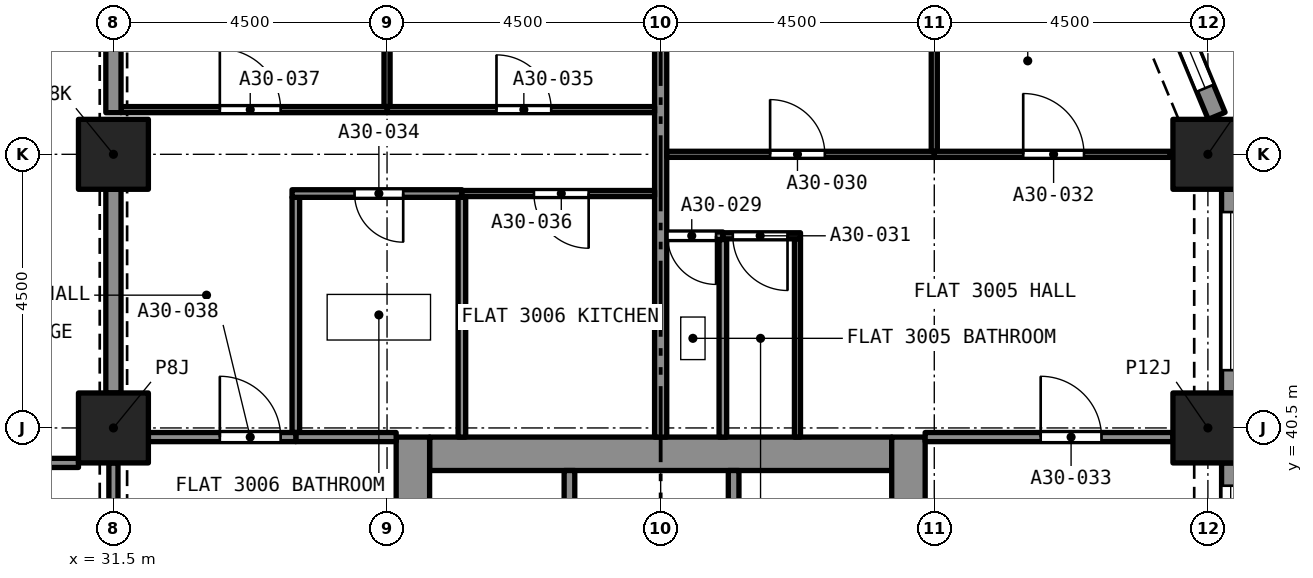
"""IFC4 building model, lengths in metres.
Left out: names, types, materials, properties, quantities, classifications, styles, units other than length and angle.
Written with IfcOpenShell. Run it as: python <this file> out.ifc"""

import sys

from ifc_helpers import new_model, si_unit, direction, frame, frame_2d, origin, origin_2d, place, context, subcontext, project, spatial, rectangle, extrude, element, fill, save


model = new_model("IFC4")
c1 = context("Model", 3, precision=1e-05, world=origin(), true_north=direction((0.0, 1.0)))
c2 = subcontext(c1, "Body", "Model", "MODEL_VIEW")
j1 = project(units=[si_unit("LENGTHUNIT", "METRE"), si_unit("PLANEANGLEUNIT", "RADIAN")], contexts=[c1])
p1 = place(None, origin())
s1 = spatial("IfcSite", under=j1, at=p1, CompositionType="ELEMENT")
p2 = place(p1, origin())
s2 = spatial("IfcBuilding", under=s1, at=p2, CompositionType="ELEMENT")
p3 = place(p2, frame((0.0, 0.0, 108.8)))
s3 = spatial("IfcBuildingStorey", under=s2, at=p3, CompositionType="ELEMENT", Elevation=108.8)
for number, where, z_axis, x_axis in (
    (1, (31.5, 40.5, 0.0), (0.0, 0.0, 1.0), (1.0, 0.0, 0.0)),
    (2, (49.5, 40.5, 0.0), (0.0, 0.0, 1.0), (1.0, 0.0, 0.0)),
    (3, (31.5, 45.0, 0.0), (0.0, 0.0, 1.0), (1.0, 0.0, 0.0)),
    (4, (49.5, 45.0, 0.0), (0.0, 0.0, 1.0), (1.0, 0.0, 0.0)),
):
    element("IfcColumn", number, at=place(p3, frame(where, z_axis=z_axis, x_axis=x_axis)), inside=s3, PredefinedType="COLUMN", context=c2, shape_type="SweptSolid", body=[
        extrude(rectangle(XDim=1.15, YDim=1.15, at=origin_2d()), origin(), (0.0, 0.0, 1.0), 3.2),
    ])
p4 = place(p3, frame((36.7, 40.075, 0.0), z_axis=(0.0, 0.0, 1.0), x_axis=(1.0, 0.0, 0.0)))
e5 = element("IfcWall", 5, at=p4, inside=s3, PredefinedType="SOLIDWALL", context=c2, shape_type="SweptSolid", body=[
    extrude(rectangle(XDim=7.6, YDim=0.55, at=frame_2d((3.8, 0.0))), origin(), (0.0, 0.0, 1.0), 3.2),
])
p5 = place(p3, frame((36.425, 27.15, 0.0), z_axis=(0.0, 0.0, 1.0), x_axis=(0.0, 1.0, 0.0)))
e6 = element("IfcWall", 6, at=p5, inside=s3, PredefinedType="SOLIDWALL", context=c2, shape_type="SweptSolid", body=[
    extrude(rectangle(XDim=13.2, YDim=0.55, at=frame_2d((6.6, 0.0))), origin(), (0.0, 0.0, 1.0), 3.2),
])
p6 = place(p5, frame((8.8, 0.0, 0.0)))
e7 = element("IfcOpeningElement", 7, at=p6, cuts=e6, PredefinedType="OPENING", context=c2, shape_type="SweptSolid", body=[
    extrude(rectangle(XDim=1.2, YDim=2.1, at=frame_2d((0.6, 1.05))), frame((0.0, 0.285, 0.0), z_axis=(0.0, -1.0, 0.0), x_axis=(1.0, 0.0, 0.0)), (0.0, 0.0, 1.0), 0.57),
])
p7 = place(p3, frame((44.575, 27.15, 0.0), z_axis=(0.0, 0.0, 1.0), x_axis=(0.0, 1.0, 0.0)))
e8 = element("IfcWall", 8, at=p7, inside=s3, PredefinedType="SOLIDWALL", context=c2, shape_type="SweptSolid", body=[
    extrude(rectangle(XDim=13.2, YDim=0.55, at=frame_2d((6.6, 0.0))), origin(), (0.0, 0.0, 1.0), 3.2),
])
p8 = place(p7, frame((8.8, 0.0, 0.0)))
e9 = element("IfcOpeningElement", 9, at=p8, cuts=e8, PredefinedType="OPENING", context=c2, shape_type="SweptSolid", body=[
    extrude(rectangle(XDim=1.2, YDim=2.1, at=frame_2d((0.6, 1.05))), frame((0.0, 0.285, 0.0), z_axis=(0.0, -1.0, 0.0), x_axis=(1.0, 0.0, 0.0)), (0.0, 0.0, 1.0), 0.57),
])
p9 = place(p3, frame((49.875, 39.925, 0.0), z_axis=(0.0, 0.0, 1.0), x_axis=(0.0, -1.0, 0.0)))
e10 = element("IfcWall", 10, at=p9, inside=s3, PredefinedType="SOLIDWALL", context=c2, shape_type="SweptSolid", body=[
    extrude(rectangle(XDim=3.35, YDim=0.3, at=frame_2d((1.675, 0.0))), origin(), (0.0, 0.0, 1.0), 3.2),
])
p10 = place(p9, frame((0.375, 0.0, 0.45)))
e11 = element("IfcOpeningElement", 11, at=p10, cuts=e10, PredefinedType="OPENING", context=c2, shape_type="SweptSolid", body=[
    extrude(rectangle(XDim=2.6, YDim=1.95, at=frame_2d((1.3, 0.975))), frame((0.0, 0.16, 0.0), z_axis=(0.0, -1.0, 0.0), x_axis=(1.0, 0.0, 0.0)), (0.0, 0.0, 1.0), 0.32),
])
p11 = place(p3, frame((49.875, 44.425, 0.0), z_axis=(0.0, 0.0, 1.0), x_axis=(0.0, -1.0, 0.0)))
e12 = element("IfcWall", 12, at=p11, inside=s3, PredefinedType="SOLIDWALL", context=c2, shape_type="SweptSolid", body=[
    extrude(rectangle(XDim=3.35, YDim=0.3, at=frame_2d((1.675, 0.0))), origin(), (0.0, 0.0, 1.0), 3.2),
])
p12 = place(p11, frame((0.375, 0.0, 0.45)))
e13 = element("IfcOpeningElement", 13, at=p12, cuts=e12, PredefinedType="OPENING", context=c2, shape_type="SweptSolid", body=[
    extrude(rectangle(XDim=2.6, YDim=1.95, at=frame_2d((1.3, 0.975))), frame((0.0, 0.16, 0.0), z_axis=(0.0, -1.0, 0.0), x_axis=(1.0, 0.0, 0.0)), (0.0, 0.0, 1.0), 0.32),
])
p13 = place(p3, frame((48.816, 47.631, 0.0), z_axis=(0.0, 0.0, 1.0), x_axis=(0.382723818695, -0.923862802911, 0.0)))
e14 = element("IfcWall", 14, at=p13, inside=s3, PredefinedType="SOLIDWALL", context=c2, shape_type="SweptSolid", body=[
    extrude(rectangle(XDim=2.164, YDim=0.3, at=frame_2d((1.082, 0.0))), origin(), (0.0, 0.0, 1.0), 3.2),
])
p14 = place(p13, frame((0.271, 0.0, 0.45)))
e15 = element("IfcOpeningElement", 15, at=p14, cuts=e14, PredefinedType="OPENING", context=c2, shape_type="SweptSolid", body=[
    extrude(rectangle(XDim=1.4, YDim=1.95, at=frame_2d((0.7, 0.975))), frame((0.0, 0.16, 0.0), z_axis=(0.0, -1.0, 0.0), x_axis=(1.0, 0.0, 0.0)), (0.0, 0.0, 1.0), 0.32),
])
p15 = place(p3, frame((41.523, 43.66, 0.0), z_axis=(0.0, 0.0, 1.0), x_axis=(-1.0, 0.0, 0.0)))
e16 = element("IfcWall", 16, at=p15, inside=s3, PredefinedType="PARTITIONING", context=c2, shape_type="SweptSolid", body=[
    extrude(rectangle(XDim=0.923, YDim=0.125, at=frame_2d((0.461, 0.0))), origin(), (0.0, 0.0, 1.0), 2.9),
])
p16 = place(p15, frame((0.111, 0.0, 0.0)))
e17 = element("IfcOpeningElement", 17, at=p16, cuts=e16, PredefinedType="OPENING", context=c2, shape_type="SweptSolid", body=[
    extrude(rectangle(XDim=0.8, YDim=2.1, at=frame_2d((0.4, 1.05))), frame((0.0, 0.073, 0.0), z_axis=(0.0, -1.0, 0.0), x_axis=(1.0, 0.0, 0.0)), (0.0, 0.0, 1.0), 0.145),
])
p17 = place(p3, frame((41.523, 40.35, 0.0), z_axis=(0.0, 0.0, 1.0), x_axis=(0.0, 1.0, 0.0)))
e18 = element("IfcWall", 18, at=p17, inside=s3, PredefinedType="PARTITIONING", context=c2, shape_type="SweptSolid", body=[
    extrude(rectangle(XDim=3.247, YDim=0.125, at=frame_2d((1.624, 0.0))), origin(), (0.0, 0.0, 1.0), 2.9),
])
p18 = place(p3, frame((40.5, 40.35, 0.0), z_axis=(0.0, 0.0, 1.0), x_axis=(0.0, 1.0, 0.0)))
e19 = element("IfcWall", 19, at=p18, inside=s3, PredefinedType="PARTITIONING", context=c2, shape_type="SweptSolid", body=[
    extrude(rectangle(XDim=8.575, YDim=0.2, at=frame_2d((4.288, 0.0))), origin(), (0.0, 0.0, 1.0), 2.9),
])
p19 = place(p3, frame((40.6, 45.0, 0.0), z_axis=(0.0, 0.0, 1.0), x_axis=(1.0, 0.0, 0.0)))
e20 = element("IfcWall", 20, at=p19, inside=s3, PredefinedType="PARTITIONING", context=c2, shape_type="SweptSolid", body=[
    extrude(rectangle(XDim=4.4, YDim=0.1, at=frame_2d((2.2, 0.0))), origin(), (0.0, 0.0, 1.0), 2.9),
])
p20 = place(p19, frame((1.7, 0.0, 0.0)))
e21 = element("IfcOpeningElement", 21, at=p20, cuts=e20, PredefinedType="OPENING", context=c2, shape_type="SweptSolid", body=[
    extrude(rectangle(XDim=0.9, YDim=2.1, at=frame_2d((0.45, 1.05))), frame((0.0, 0.06, 0.0), z_axis=(0.0, -1.0, 0.0), x_axis=(1.0, 0.0, 0.0)), (0.0, 0.0, 1.0), 0.12),
])
p21 = place(p3, frame((45.0, 45.05, 0.0), z_axis=(0.0, 0.0, 1.0), x_axis=(0.0, 1.0, 0.0)))
e22 = element("IfcWall", 22, at=p21, inside=s3, PredefinedType="PARTITIONING", context=c2, shape_type="SweptSolid", body=[
    extrude(rectangle(XDim=3.828, YDim=0.1, at=frame_2d((1.914, 0.0))), origin(), (0.0, 0.0, 1.0), 2.9),
])
p22 = place(p3, frame((42.75, 40.35, 0.0), z_axis=(0.0, 0.0, 1.0), x_axis=(0.0, 1.0, 0.0)))
e23 = element("IfcWall", 23, at=p22, inside=s3, PredefinedType="PARTITIONING", context=c2, shape_type="SweptSolid", body=[
    extrude(rectangle(XDim=3.26, YDim=0.1, at=frame_2d((1.63, 0.0))), origin(), (0.0, 0.0, 1.0), 2.9),
])
p23 = place(p3, frame((42.8, 43.66, 0.0), z_axis=(0.0, 0.0, 1.0), x_axis=(-1.0, 0.0, 0.0)))
e24 = element("IfcWall", 24, at=p23, inside=s3, PredefinedType="PARTITIONING", context=c2, shape_type="SweptSolid", body=[
    extrude(rectangle(XDim=1.277, YDim=0.1, at=frame_2d((0.639, 0.0))), origin(), (0.0, 0.0, 1.0), 2.9),
])
p24 = place(p23, frame((0.214, 0.0, 0.0)))
e25 = element("IfcOpeningElement", 25, at=p24, cuts=e24, PredefinedType="OPENING", context=c2, shape_type="SweptSolid", body=[
    extrude(rectangle(XDim=0.9, YDim=2.1, at=frame_2d((0.45, 1.05))), frame((0.0, 0.06, 0.0), z_axis=(0.0, -1.0, 0.0), x_axis=(1.0, 0.0, 0.0)), (0.0, 0.0, 1.0), 0.12),
])
p25 = place(p3, frame((45.0, 45.0, 0.0), z_axis=(0.0, 0.0, 1.0), x_axis=(1.0, 0.0, 0.0)))
e26 = element("IfcWall", 26, at=p25, inside=s3, PredefinedType="PARTITIONING", context=c2, shape_type="SweptSolid", body=[
    extrude(rectangle(XDim=3.878, YDim=0.1, at=frame_2d((1.939, 0.0))), origin(), (0.0, 0.0, 1.0), 2.9),
])
p26 = place(p25, frame((1.462, 0.0, 0.0)))
e27 = element("IfcOpeningElement", 27, at=p26, cuts=e26, PredefinedType="OPENING", context=c2, shape_type="SweptSolid", body=[
    extrude(rectangle(XDim=1.0, YDim=2.1, at=frame_2d((0.5, 1.05))), frame((0.0, 0.06, 0.0), z_axis=(0.0, -1.0, 0.0), x_axis=(1.0, 0.0, 0.0)), (0.0, 0.0, 1.0), 0.12),
])
p27 = place(p3, frame((44.85, 40.35, 0.0), z_axis=(0.0, 0.0, 1.0), x_axis=(1.0, 0.0, 0.0)))
e28 = element("IfcWall", 28, at=p27, inside=s3, PredefinedType="PARTITIONING", context=c2, shape_type="SweptSolid", body=[
    extrude(rectangle(XDim=4.075, YDim=0.15, at=frame_2d((2.038, 0.0))), origin(), (0.0, 0.0, 1.0), 2.9),
])
p28 = place(p27, frame((1.9, 0.0, 0.0)))
e29 = element("IfcOpeningElement", 29, at=p28, cuts=e28, PredefinedType="OPENING", context=c2, shape_type="SweptSolid", body=[
    extrude(rectangle(XDim=1.0, YDim=2.1, at=frame_2d((0.5, 1.05))), frame((0.0, 0.085, 0.0), z_axis=(0.0, -1.0, 0.0), x_axis=(1.0, 0.0, 0.0)), (0.0, 0.0, 1.0), 0.17),
])
p29 = place(p3, frame((34.5, 40.425, 0.0), z_axis=(0.0, 0.0, 1.0), x_axis=(0.0, 1.0, 0.0)))
e30 = element("IfcWall", 30, at=p29, inside=s3, PredefinedType="PARTITIONING", context=c2, shape_type="SweptSolid", body=[
    extrude(rectangle(XDim=3.867, YDim=0.125, at=frame_2d((1.934, 0.0))), origin(), (0.0, 0.0, 1.0), 2.9),
])
p30 = place(p3, frame((37.231, 44.355, 0.0), z_axis=(0.0, 0.0, 1.0), x_axis=(-1.0, 0.0, 0.0)))
e31 = element("IfcWall", 31, at=p30, inside=s3, PredefinedType="PARTITIONING", context=c2, shape_type="SweptSolid", body=[
    extrude(rectangle(XDim=2.794, YDim=0.125, at=frame_2d((1.397, 0.0))), origin(), (0.0, 0.0, 1.0), 2.9),
])
p31 = place(p30, frame((0.966, 0.0, 0.0)))
e32 = element("IfcOpeningElement", 32, at=p31, cuts=e31, PredefinedType="OPENING", context=c2, shape_type="SweptSolid", body=[
    extrude(rectangle(XDim=0.8, YDim=2.1, at=frame_2d((0.4, 1.05))), frame((0.0, 0.073, 0.0), z_axis=(0.0, -1.0, 0.0), x_axis=(1.0, 0.0, 0.0)), (0.0, 0.0, 1.0), 0.145),
])
p32 = place(p3, frame((37.231, 40.35, 0.0), z_axis=(0.0, 0.0, 1.0), x_axis=(0.0, 1.0, 0.0)))
e33 = element("IfcWall", 33, at=p32, inside=s3, PredefinedType="PARTITIONING", context=c2, shape_type="SweptSolid", body=[
    extrude(rectangle(XDim=3.942, YDim=0.125, at=frame_2d((1.971, 0.0))), origin(), (0.0, 0.0, 1.0), 2.9),
])
p33 = place(p3, frame((34.5, 40.35, 0.0), z_axis=(0.0, 0.0, 1.0), x_axis=(1.0, 0.0, 0.0)))
e34 = element("IfcWall", 34, at=p33, inside=s3, PredefinedType="PARTITIONING", context=c2, shape_type="SweptSolid", body=[
    extrude(rectangle(XDim=1.65, YDim=0.15, at=frame_2d((0.825, 0.0))), origin(), (0.0, 0.0, 1.0), 2.9),
])
p34 = place(p3, frame((36.0, 45.735, 0.0), z_axis=(0.0, 0.0, 1.0), x_axis=(1.0, 0.0, 0.0)))
e35 = element("IfcWall", 35, at=p34, inside=s3, PredefinedType="PARTITIONING", context=c2, shape_type="SweptSolid", body=[
    extrude(rectangle(XDim=4.4, YDim=0.1, at=frame_2d((2.2, 0.0))), origin(), (0.0, 0.0, 1.0), 2.9),
])
p35 = place(p34, frame((1.8, 0.0, 0.0)))
e36 = element("IfcOpeningElement", 36, at=p35, cuts=e35, PredefinedType="OPENING", context=c2, shape_type="SweptSolid", body=[
    extrude(rectangle(XDim=0.9, YDim=2.1, at=frame_2d((0.45, 1.05))), frame((0.0, 0.06, 0.0), z_axis=(0.0, -1.0, 0.0), x_axis=(1.0, 0.0, 0.0)), (0.0, 0.0, 1.0), 0.12),
])
p36 = place(p3, frame((36.0, 45.785, 0.0), z_axis=(0.0, 0.0, 1.0), x_axis=(0.0, 1.0, 0.0)))
e37 = element("IfcWall", 37, at=p36, inside=s3, PredefinedType="PARTITIONING", context=c2, shape_type="SweptSolid", body=[
    extrude(rectangle(XDim=3.14, YDim=0.1, at=frame_2d((1.57, 0.0))), origin(), (0.0, 0.0, 1.0), 2.9),
])
p37 = place(p3, frame((40.4, 44.355, 0.0), z_axis=(0.0, 0.0, 1.0), x_axis=(-1.0, 0.0, 0.0)))
e38 = element("IfcWall", 38, at=p37, inside=s3, PredefinedType="PARTITIONING", context=c2, shape_type="SweptSolid", body=[
    extrude(rectangle(XDim=3.168, YDim=0.1, at=frame_2d((1.584, 0.0))), origin(), (0.0, 0.0, 1.0), 2.9),
])
p38 = place(p37, frame((1.084, 0.0, 0.0)))
e39 = element("IfcOpeningElement", 39, at=p38, cuts=e38, PredefinedType="OPENING", context=c2, shape_type="SweptSolid", body=[
    extrude(rectangle(XDim=0.9, YDim=2.1, at=frame_2d((0.45, 1.05))), frame((0.0, 0.06, 0.0), z_axis=(0.0, -1.0, 0.0), x_axis=(1.0, 0.0, 0.0)), (0.0, 0.0, 1.0), 0.12),
])
p39 = place(p3, frame((31.625, 45.735, 0.0), z_axis=(0.0, 0.0, 1.0), x_axis=(1.0, 0.0, 0.0)))
e40 = element("IfcWall", 40, at=p39, inside=s3, PredefinedType="PARTITIONING", context=c2, shape_type="SweptSolid", body=[
    extrude(rectangle(XDim=4.375, YDim=0.1, at=frame_2d((2.188, 0.0))), origin(), (0.0, 0.0, 1.0), 2.9),
])
p40 = place(p39, frame((1.625, 0.0, 0.0)))
e41 = element("IfcOpeningElement", 41, at=p40, cuts=e40, PredefinedType="OPENING", context=c2, shape_type="SweptSolid", body=[
    extrude(rectangle(XDim=1.0, YDim=2.1, at=frame_2d((0.5, 1.05))), frame((0.0, 0.06, 0.0), z_axis=(0.0, -1.0, 0.0), x_axis=(1.0, 0.0, 0.0)), (0.0, 0.0, 1.0), 0.12),
])
p41 = place(p3, frame((31.5, 41.075, 0.0), z_axis=(0.0, 0.0, 1.0), x_axis=(0.0, 1.0, 0.0)))
e42 = element("IfcWall", 42, at=p41, inside=s3, PredefinedType="PARTITIONING", context=c2, shape_type="SweptSolid", body=[
    extrude(rectangle(XDim=3.35, YDim=0.25, at=frame_2d((1.675, 0.0))), origin(), (0.0, 0.0, 1.0), 2.38),
])
p42 = place(p3, frame((32.075, 40.35, 0.0), z_axis=(0.0, 0.0, 1.0), x_axis=(1.0, 0.0, 0.0)))
e43 = element("IfcWall", 43, at=p42, inside=s3, PredefinedType="PARTITIONING", context=c2, shape_type="SweptSolid", body=[
    extrude(rectangle(XDim=2.425, YDim=0.15, at=frame_2d((1.212, 0.0))), origin(), (0.0, 0.0, 1.0), 2.9),
])
p43 = place(p42, frame((1.175, 0.0, 0.0)))
e44 = element("IfcOpeningElement", 44, at=p43, cuts=e43, PredefinedType="OPENING", context=c2, shape_type="SweptSolid", body=[
    extrude(rectangle(XDim=1.0, YDim=2.1, at=frame_2d((0.5, 1.05))), frame((0.0, 0.085, 0.0), z_axis=(0.0, -1.0, 0.0), x_axis=(1.0, 0.0, 0.0)), (0.0, 0.0, 1.0), 0.17),
])
p44 = place(p3, frame((31.5, 45.685, 0.0), z_axis=(0.0, 0.0, 1.0), x_axis=(0.0, 1.0, 0.0)))
e45 = element("IfcWall", 45, at=p44, inside=s3, PredefinedType="PARTITIONING", context=c2, shape_type="SweptSolid", body=[
    extrude(rectangle(XDim=3.24, YDim=0.25, at=frame_2d((1.62, 0.0))), origin(), (0.0, 0.0, 1.0), 2.38),
])
p45 = place(p3, frame((27.0, 39.925, 0.0), z_axis=(0.0, 0.0, 1.0), x_axis=(1.0, 0.0, 0.0)))
e46 = element("IfcWall", 46, at=p45, inside=s3, PredefinedType="PARTITIONING", context=c2, shape_type="SweptSolid", body=[
    extrude(rectangle(XDim=3.925, YDim=0.15, at=frame_2d((1.962, 0.0))), origin(), (0.0, 0.0, 1.0), 2.75),
])
p46 = place(p45, frame((1.75, 0.0, 0.0)))
e47 = element("IfcOpeningElement", 47, at=p46, cuts=e46, PredefinedType="OPENING", context=c2, shape_type="SweptSolid", body=[
    extrude(rectangle(XDim=1.0, YDim=2.1, at=frame_2d((0.5, 1.05))), frame((0.0, 0.085, 0.0), z_axis=(0.0, -1.0, 0.0), x_axis=(1.0, 0.0, 0.0)), (0.0, 0.0, 1.0), 0.17),
])
p47 = place(p3, frame((31.5, 36.575, 0.0), z_axis=(0.0, 0.0, 1.0), x_axis=(0.0, 1.0, 0.0)))
e48 = element("IfcWall", 48, at=p47, inside=s3, PredefinedType="PARTITIONING", context=c2, shape_type="SweptSolid", body=[
    extrude(rectangle(XDim=3.35, YDim=0.15, at=frame_2d((1.675, 0.0))), origin(), (0.0, 0.0, 1.0), 2.38),
])
p48 = place(p47, frame((1.075, 0.0, 0.0)))
e49 = element("IfcOpeningElement", 49, at=p48, cuts=e48, PredefinedType="OPENING", context=c2, shape_type="SweptSolid", body=[
    extrude(rectangle(XDim=1.2, YDim=2.1, at=frame_2d((0.6, 1.05))), frame((0.0, 0.085, 0.0), z_axis=(0.0, -1.0, 0.0), x_axis=(1.0, 0.0, 0.0)), (0.0, 0.0, 1.0), 0.17),
])
for number, where, z_axis, x_axis in (
    (50, (41.7, 37.5, 0.0), (0.0, 0.0, 1.0), (0.0, 1.0, 0.0)),
    (51, (39.0, 37.5, 0.0), (0.0, 0.0, 1.0), (0.0, 1.0, 0.0)),
):
    element("IfcWall", number, at=place(p3, frame(where, z_axis=z_axis, x_axis=x_axis)), inside=s3, PredefinedType="SOLIDWALL", context=c2, shape_type="SweptSolid", body=[
        extrude(rectangle(XDim=2.3, YDim=0.175, at=frame_2d((1.15, 0.0))), origin(), (0.0, 0.0, 1.0), 2.9),
    ])
p49 = place(p10, origin())
e52 = element("IfcWindow", 52, at=p49, inside=s3, PartitioningType="SINGLE_PANEL", PredefinedType="WINDOW", context=c2, shape_type="SweptSolid", body=[
    extrude(rectangle(XDim=2.6, YDim=1.95, at=frame_2d((1.3, 0.975))), frame((0.0, 0.03, 0.0), z_axis=(0.0, -1.0, 0.0), x_axis=(1.0, 0.0, 0.0)), (0.0, 0.0, 1.0), 0.06),
])
fill(e11, e52)
p50 = place(p12, origin())
e53 = element("IfcWindow", 53, at=p50, inside=s3, PartitioningType="SINGLE_PANEL", PredefinedType="WINDOW", context=c2, shape_type="SweptSolid", body=[
    extrude(rectangle(XDim=2.6, YDim=1.95, at=frame_2d((1.3, 0.975))), frame((0.0, 0.03, 0.0), z_axis=(0.0, -1.0, 0.0), x_axis=(1.0, 0.0, 0.0)), (0.0, 0.0, 1.0), 0.06),
])
fill(e13, e53)
p51 = place(p14, origin())
e54 = element("IfcWindow", 54, at=p51, inside=s3, PartitioningType="SINGLE_PANEL", PredefinedType="WINDOW", context=c2, shape_type="SweptSolid", body=[
    extrude(rectangle(XDim=1.4, YDim=1.95, at=frame_2d((0.7, 0.975))), frame((0.0, 0.03, 0.0), z_axis=(0.0, -1.0, 0.0), x_axis=(1.0, 0.0, 0.0)), (0.0, 0.0, 1.0), 0.06),
])
fill(e15, e54)
p52 = place(p16, origin())
e55 = element("IfcDoor", 55, at=p52, inside=s3, OperationType="SINGLE_SWING_RIGHT", PredefinedType="DOOR", context=c2, shape_type="SweptSolid", body=[
    extrude(rectangle(XDim=0.8, YDim=2.1, at=frame_2d((0.4, 1.05))), frame((0.0, 0.025, 0.0), z_axis=(0.0, -1.0, 0.0), x_axis=(1.0, 0.0, 0.0)), (0.0, 0.0, 1.0), 0.05),
])
fill(e17, e55)
p53 = place(p20, origin())
e56 = element("IfcDoor", 56, at=p53, inside=s3, OperationType="SINGLE_SWING_LEFT", PredefinedType="DOOR", context=c2, shape_type="SweptSolid", body=[
    extrude(rectangle(XDim=0.9, YDim=2.1, at=frame_2d((0.45, 1.05))), frame((0.0, 0.025, 0.0), z_axis=(0.0, -1.0, 0.0), x_axis=(1.0, 0.0, 0.0)), (0.0, 0.0, 1.0), 0.05),
])
fill(e21, e56)
p54 = place(p24, origin())
e57 = element("IfcDoor", 57, at=p54, inside=s3, OperationType="SINGLE_SWING_RIGHT", PredefinedType="DOOR", context=c2, shape_type="SweptSolid", body=[
    extrude(rectangle(XDim=0.9, YDim=2.1, at=frame_2d((0.45, 1.05))), frame((0.0, 0.025, 0.0), z_axis=(0.0, -1.0, 0.0), x_axis=(1.0, 0.0, 0.0)), (0.0, 0.0, 1.0), 0.05),
])
fill(e25, e57)
p55 = place(p26, origin())
e58 = element("IfcDoor", 58, at=p55, inside=s3, OperationType="SINGLE_SWING_RIGHT", PredefinedType="DOOR", context=c2, shape_type="SweptSolid", body=[
    extrude(rectangle(XDim=1.0, YDim=2.1, at=frame_2d((0.5, 1.05))), frame((0.0, 0.025, 0.0), z_axis=(0.0, -1.0, 0.0), x_axis=(1.0, 0.0, 0.0)), (0.0, 0.0, 1.0), 0.05),
])
fill(e27, e58)
p56 = place(p28, origin())
e59 = element("IfcDoor", 59, at=p56, inside=s3, OperationType="SINGLE_SWING_RIGHT", PredefinedType="DOOR", context=c2, shape_type="SweptSolid", body=[
    extrude(rectangle(XDim=1.0, YDim=2.1, at=frame_2d((0.5, 1.05))), frame((0.0, 0.025, 0.0), z_axis=(0.0, -1.0, 0.0), x_axis=(1.0, 0.0, 0.0)), (0.0, 0.0, 1.0), 0.05),
])
fill(e29, e59)
p57 = place(p31, origin())
e60 = element("IfcDoor", 60, at=p57, inside=s3, OperationType="SINGLE_SWING_LEFT", PredefinedType="DOOR", context=c2, shape_type="SweptSolid", body=[
    extrude(rectangle(XDim=0.8, YDim=2.1, at=frame_2d((0.4, 1.05))), frame((0.0, 0.025, 0.0), z_axis=(0.0, -1.0, 0.0), x_axis=(1.0, 0.0, 0.0)), (0.0, 0.0, 1.0), 0.05),
])
fill(e32, e60)
p58 = place(p35, origin())
e61 = element("IfcDoor", 61, at=p58, inside=s3, OperationType="SINGLE_SWING_RIGHT", PredefinedType="DOOR", context=c2, shape_type="SweptSolid", body=[
    extrude(rectangle(XDim=0.9, YDim=2.1, at=frame_2d((0.45, 1.05))), frame((0.0, 0.025, 0.0), z_axis=(0.0, -1.0, 0.0), x_axis=(1.0, 0.0, 0.0)), (0.0, 0.0, 1.0), 0.05),
])
fill(e36, e61)
p59 = place(p38, origin())
e62 = element("IfcDoor", 62, at=p59, inside=s3, OperationType="SINGLE_SWING_LEFT", PredefinedType="DOOR", context=c2, shape_type="SweptSolid", body=[
    extrude(rectangle(XDim=0.9, YDim=2.1, at=frame_2d((0.45, 1.05))), frame((0.0, 0.025, 0.0), z_axis=(0.0, -1.0, 0.0), x_axis=(1.0, 0.0, 0.0)), (0.0, 0.0, 1.0), 0.05),
])
fill(e39, e62)
p60 = place(p40, origin())
e63 = element("IfcDoor", 63, at=p60, inside=s3, OperationType="SINGLE_SWING_LEFT", PredefinedType="DOOR", context=c2, shape_type="SweptSolid", body=[
    extrude(rectangle(XDim=1.0, YDim=2.1, at=frame_2d((0.5, 1.05))), frame((0.0, 0.025, 0.0), z_axis=(0.0, -1.0, 0.0), x_axis=(1.0, 0.0, 0.0)), (0.0, 0.0, 1.0), 0.05),
])
fill(e41, e63)
p61 = place(p43, origin())
e64 = element("IfcDoor", 64, at=p61, inside=s3, OperationType="SINGLE_SWING_RIGHT", PredefinedType="DOOR", context=c2, shape_type="SweptSolid", body=[
    extrude(rectangle(XDim=1.0, YDim=2.1, at=frame_2d((0.5, 1.05))), frame((0.0, 0.025, 0.0), z_axis=(0.0, -1.0, 0.0), x_axis=(1.0, 0.0, 0.0)), (0.0, 0.0, 1.0), 0.05),
])
fill(e44, e64)
save(model, sys.argv[1])
